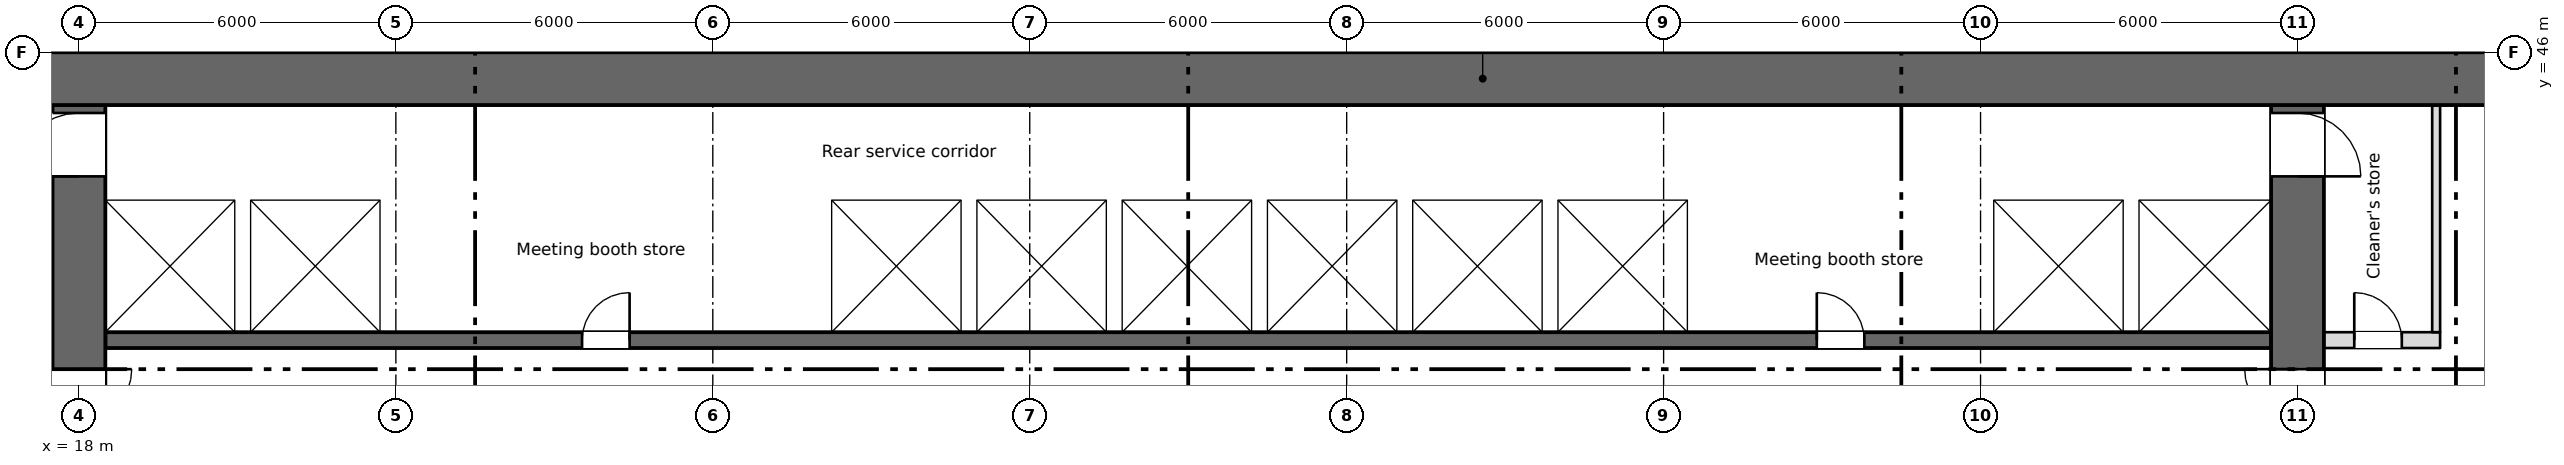
"""IFC4 building model, lengths in metres.
Left out: names, types, materials, properties, quantities, classifications, styles, units other than length and angle.
Written with IfcOpenShell. Run it as: python <this file> out.ifc"""

import sys

from ifc_helpers import new_model, si_unit, direction, frame, frame_2d, origin, place, context, subcontext, project, spatial, rectangle, extrude, element, fill, save


model = new_model("IFC4")
c1 = context("Model", 3, precision=1e-05, world=origin(), true_north=direction((0.0, 1.0)))
c2 = subcontext(c1, "Body", "Model", "MODEL_VIEW")
j1 = project(units=[si_unit("LENGTHUNIT", "METRE"), si_unit("PLANEANGLEUNIT", "RADIAN")], contexts=[c1])
p1 = place(None, origin())
s1 = spatial("IfcSite", under=j1, at=p1, CompositionType="ELEMENT")
p2 = place(p1, origin())
s2 = spatial("IfcBuilding", under=s1, at=p2, CompositionType="ELEMENT")
p3 = place(p2, frame((0.0, 0.0, 67.5)))
s3 = spatial("IfcBuildingStorey", under=s2, at=p3, CompositionType="ELEMENT", Elevation=67.5)
p4 = place(p3, frame((5.55, 45.5, 0.0), z_axis=(0.0, 0.0, 1.0), x_axis=(1.0, 0.0, 0.0)))
e1 = element("IfcWall", 1, at=p4, inside=s3, PredefinedType="SHEAR", context=c2, shape_type="SweptSolid", body=[
    extrude(rectangle(XDim=66.9, YDim=1.0, at=frame_2d((33.45, 0.0))), origin(), (0.0, 0.0, 1.0), 3.35),
])
p5 = place(p4, frame((1.2, 0.0, 0.6)))
e2 = element("IfcOpeningElement", 2, at=p5, cuts=e1, PredefinedType="OPENING", context=c2, shape_type="SweptSolid", body=[
    extrude(rectangle(XDim=0.6, YDim=2.4, at=frame_2d((0.3, 1.2))), frame((0.0, 0.51, 0.0), z_axis=(0.0, -1.0, 0.0), x_axis=(1.0, 0.0, 0.0)), (0.0, 0.0, 1.0), 1.02),
])
p6 = place(p4, frame((7.2, 0.0, 0.6)))
e3 = element("IfcOpeningElement", 3, at=p6, cuts=e1, PredefinedType="OPENING", context=c2, shape_type="SweptSolid", body=[
    extrude(rectangle(XDim=0.6, YDim=2.4, at=frame_2d((0.3, 1.2))), frame((0.0, 0.51, 0.0), z_axis=(0.0, -1.0, 0.0), x_axis=(1.0, 0.0, 0.0)), (0.0, 0.0, 1.0), 1.02),
])
p7 = place(p4, frame((61.2, 0.0, 0.6)))
e4 = element("IfcOpeningElement", 4, at=p7, cuts=e1, PredefinedType="OPENING", context=c2, shape_type="SweptSolid", body=[
    extrude(rectangle(XDim=0.6, YDim=2.4, at=frame_2d((0.3, 1.2))), frame((0.0, 0.51, 0.0), z_axis=(0.0, -1.0, 0.0), x_axis=(1.0, 0.0, 0.0)), (0.0, 0.0, 1.0), 1.02),
])
p8 = place(p3, frame((18.0, 28.4, 0.0), z_axis=(0.0, 0.0, 1.0), x_axis=(0.0, 1.0, 0.0)))
e5 = element("IfcWall", 5, at=p8, inside=s3, PredefinedType="SHEAR", context=c2, shape_type="SweptSolid", body=[
    extrude(rectangle(XDim=16.6, YDim=1.0, at=frame_2d((8.3, 0.0))), origin(), (0.0, 0.0, 1.0), 3.35),
])
p9 = place(p8, frame((9.6, 0.0, 0.0)))
e6 = element("IfcOpeningElement", 6, at=p9, cuts=e5, PredefinedType="OPENING", context=c2, shape_type="SweptSolid", body=[
    extrude(rectangle(XDim=2.0, YDim=2.1, at=frame_2d((1.0, 1.05))), frame((0.0, 0.51, 0.0), z_axis=(0.0, -1.0, 0.0), x_axis=(1.0, 0.0, 0.0)), (0.0, 0.0, 1.0), 1.02),
])
p10 = place(p8, frame((15.25, 0.0, 0.0)))
e7 = element("IfcOpeningElement", 7, at=p10, cuts=e5, PredefinedType="OPENING", context=c2, shape_type="SweptSolid", body=[
    extrude(rectangle(XDim=1.2, YDim=2.1, at=frame_2d((0.6, 1.05))), frame((0.0, 0.51, 0.0), z_axis=(0.0, -1.0, 0.0), x_axis=(1.0, 0.0, 0.0)), (0.0, 0.0, 1.0), 1.02),
])
p11 = place(p3, frame((60.0, 28.4, 0.0), z_axis=(0.0, 0.0, 1.0), x_axis=(0.0, 1.0, 0.0)))
e8 = element("IfcWall", 8, at=p11, inside=s3, PredefinedType="SHEAR", context=c2, shape_type="SweptSolid", body=[
    extrude(rectangle(XDim=16.6, YDim=1.0, at=frame_2d((8.3, 0.0))), origin(), (0.0, 0.0, 1.0), 3.35),
])
p12 = place(p11, frame((9.6, 0.0, 0.0)))
e9 = element("IfcOpeningElement", 9, at=p12, cuts=e8, PredefinedType="OPENING", context=c2, shape_type="SweptSolid", body=[
    extrude(rectangle(XDim=2.0, YDim=2.1, at=frame_2d((1.0, 1.05))), frame((0.0, 0.51, 0.0), z_axis=(0.0, -1.0, 0.0), x_axis=(1.0, 0.0, 0.0)), (0.0, 0.0, 1.0), 1.02),
])
p13 = place(p11, frame((15.25, 0.0, 0.0)))
e10 = element("IfcOpeningElement", 10, at=p13, cuts=e8, PredefinedType="OPENING", context=c2, shape_type="SweptSolid", body=[
    extrude(rectangle(XDim=1.2, YDim=2.1, at=frame_2d((0.6, 1.05))), frame((0.0, 0.51, 0.0), z_axis=(0.0, -1.0, 0.0), x_axis=(1.0, 0.0, 0.0)), (0.0, 0.0, 1.0), 1.02),
])
p14 = place(p3, frame((18.5, 40.55, 0.0), z_axis=(0.0, 0.0, 1.0), x_axis=(1.0, 0.0, 0.0)))
e11 = element("IfcWall", 11, at=p14, inside=s3, PredefinedType="SHEAR", context=c2, shape_type="SweptSolid", body=[
    extrude(rectangle(XDim=41.0, YDim=0.3, at=frame_2d((20.5, 0.0))), origin(), (0.0, 0.0, 1.0), 3.35),
])
p15 = place(p14, frame((9.025, 0.0, 0.0)))
e12 = element("IfcOpeningElement", 12, at=p15, cuts=e11, PredefinedType="OPENING", context=c2, shape_type="SweptSolid", body=[
    extrude(rectangle(XDim=0.9, YDim=2.1, at=frame_2d((0.45, 1.05))), frame((0.0, 0.16, 0.0), z_axis=(0.0, -1.0, 0.0), x_axis=(1.0, 0.0, 0.0)), (0.0, 0.0, 1.0), 0.32),
])
p16 = place(p14, frame((32.4, 0.0, 0.0)))
e13 = element("IfcOpeningElement", 13, at=p16, cuts=e11, PredefinedType="OPENING", context=c2, shape_type="SweptSolid", body=[
    extrude(rectangle(XDim=0.9, YDim=2.1, at=frame_2d((0.45, 1.05))), frame((0.0, 0.16, 0.0), z_axis=(0.0, -1.0, 0.0), x_axis=(1.0, 0.0, 0.0)), (0.0, 0.0, 1.0), 0.32),
])
p17 = place(p14, frame((14.425, 0.0, 0.0)))
e14 = element("IfcOpeningElement", 14, at=p17, cuts=e11, PredefinedType="OPENING", context=c2, shape_type="SweptSolid", body=[
    extrude(rectangle(XDim=1.1, YDim=2.1, at=frame_2d((0.55, 1.05))), frame((0.0, 0.16, 0.0), z_axis=(0.0, -1.0, 0.0), x_axis=(1.0, 0.0, 0.0)), (0.0, 0.0, 1.0), 0.32),
])
p18 = place(p14, frame((17.175, 0.0, 0.0)))
e15 = element("IfcOpeningElement", 15, at=p18, cuts=e11, PredefinedType="OPENING", context=c2, shape_type="SweptSolid", body=[
    extrude(rectangle(XDim=1.1, YDim=2.1, at=frame_2d((0.55, 1.05))), frame((0.0, 0.16, 0.0), z_axis=(0.0, -1.0, 0.0), x_axis=(1.0, 0.0, 0.0)), (0.0, 0.0, 1.0), 0.32),
])
p19 = place(p14, frame((19.925, 0.0, 0.0)))
e16 = element("IfcOpeningElement", 16, at=p19, cuts=e11, PredefinedType="OPENING", context=c2, shape_type="SweptSolid", body=[
    extrude(rectangle(XDim=1.1, YDim=2.1, at=frame_2d((0.55, 1.05))), frame((0.0, 0.16, 0.0), z_axis=(0.0, -1.0, 0.0), x_axis=(1.0, 0.0, 0.0)), (0.0, 0.0, 1.0), 0.32),
])
p20 = place(p14, frame((22.675, 0.0, 0.0)))
e17 = element("IfcOpeningElement", 17, at=p20, cuts=e11, PredefinedType="OPENING", context=c2, shape_type="SweptSolid", body=[
    extrude(rectangle(XDim=1.1, YDim=2.1, at=frame_2d((0.55, 1.05))), frame((0.0, 0.16, 0.0), z_axis=(0.0, -1.0, 0.0), x_axis=(1.0, 0.0, 0.0)), (0.0, 0.0, 1.0), 0.32),
])
p21 = place(p14, frame((36.375, 0.0, 0.0)))
e18 = element("IfcOpeningElement", 18, at=p21, cuts=e11, PredefinedType="OPENING", context=c2, shape_type="SweptSolid", body=[
    extrude(rectangle(XDim=1.2, YDim=2.1, at=frame_2d((0.6, 1.05))), frame((0.0, 0.16, 0.0), z_axis=(0.0, -1.0, 0.0), x_axis=(1.0, 0.0, 0.0)), (0.0, 0.0, 1.0), 0.32),
])
p22 = place(p14, frame((39.15, 0.0, 0.0)))
e19 = element("IfcOpeningElement", 19, at=p22, cuts=e11, PredefinedType="OPENING", context=c2, shape_type="SweptSolid", body=[
    extrude(rectangle(XDim=1.2, YDim=2.1, at=frame_2d((0.6, 1.05))), frame((0.0, 0.16, 0.0), z_axis=(0.0, -1.0, 0.0), x_axis=(1.0, 0.0, 0.0)), (0.0, 0.0, 1.0), 0.32),
])
p23 = place(p3, frame((18.5, 43.35, 0.0), z_axis=(0.0, 0.0, 1.0), x_axis=(1.0, 0.0, 0.0)))
e20 = element("IfcWall", 20, at=p23, inside=s3, PredefinedType="SHEAR", context=c2, shape_type="SweptSolid", body=[
    extrude(rectangle(XDim=41.0, YDim=0.3, at=frame_2d((20.5, 0.0))), origin(), (0.0, 0.0, 1.0), 3.35),
])
p24 = place(p3, frame((60.5, 40.55, 0.0), z_axis=(0.0, 0.0, 1.0), x_axis=(1.0, 0.0, 0.0)))
e21 = element("IfcWall", 21, at=p24, inside=s3, PredefinedType="PARTITIONING", context=c2, shape_type="SweptSolid", body=[
    extrude(rectangle(XDim=2.2, YDim=0.3, at=frame_2d((1.1, 0.0))), origin(), (0.0, 0.0, 1.0), 3.35),
])
p25 = place(p24, frame((0.575, 0.0, 0.0)))
e22 = element("IfcOpeningElement", 22, at=p25, cuts=e21, PredefinedType="OPENING", context=c2, shape_type="SweptSolid", body=[
    extrude(rectangle(XDim=0.9, YDim=2.1, at=frame_2d((0.45, 1.05))), frame((0.0, 0.16, 0.0), z_axis=(0.0, -1.0, 0.0), x_axis=(1.0, 0.0, 0.0)), (0.0, 0.0, 1.0), 0.32),
])
for number, where, z_axis, x_axis in (
    (23, (21.1, 40.7, 0.0), (0.0, 0.0, 1.0), (0.0, 1.0, 0.0)),
    (24, (23.85, 40.7, 0.0), (0.0, 0.0, 1.0), (0.0, 1.0, 0.0)),
    (25, (32.1, 40.7, 0.0), (0.0, 0.0, 1.0), (0.0, 1.0, 0.0)),
    (26, (34.85, 40.7, 0.0), (0.0, 0.0, 1.0), (0.0, 1.0, 0.0)),
    (27, (37.6, 40.7, 0.0), (0.0, 0.0, 1.0), (0.0, 1.0, 0.0)),
    (28, (40.35, 40.7, 0.0), (0.0, 0.0, 1.0), (0.0, 1.0, 0.0)),
    (29, (43.1, 40.7, 0.0), (0.0, 0.0, 1.0), (0.0, 1.0, 0.0)),
    (30, (45.85, 40.7, 0.0), (0.0, 0.0, 1.0), (0.0, 1.0, 0.0)),
    (31, (48.6, 40.7, 0.0), (0.0, 0.0, 1.0), (0.0, 1.0, 0.0)),
    (32, (54.1, 40.7, 0.0), (0.0, 0.0, 1.0), (0.0, 1.0, 0.0)),
    (33, (56.85, 40.7, 0.0), (0.0, 0.0, 1.0), (0.0, 1.0, 0.0)),
):
    element("IfcWall", number, at=place(p3, frame(where, z_axis=z_axis, x_axis=x_axis)), inside=s3, PredefinedType="SHEAR", context=c2, shape_type="SweptSolid", body=[
        extrude(rectangle(XDim=2.5, YDim=0.3, at=frame_2d((1.25, 0.0))), origin(), (0.0, 0.0, 1.0), 3.35),
    ])
p26 = place(p3, frame((62.625, 40.7, 0.0), z_axis=(0.0, 0.0, 1.0), x_axis=(0.0, 1.0, 0.0)))
e34 = element("IfcWall", 34, at=p26, inside=s3, PredefinedType="PARTITIONING", context=c2, shape_type="SweptSolid", body=[
    extrude(rectangle(XDim=4.3, YDim=0.15, at=frame_2d((2.15, 0.0))), origin(), (0.0, 0.0, 1.0), 3.35),
])
p27 = place(p25, origin())
e35 = element("IfcDoor", 35, at=p27, inside=s3, OperationType="SINGLE_SWING_LEFT", PredefinedType="DOOR", context=c2, shape_type="SweptSolid", body=[
    extrude(rectangle(XDim=0.9, YDim=2.1, at=frame_2d((0.45, 1.05))), frame((0.0, 0.025, 0.0), z_axis=(0.0, -1.0, 0.0), x_axis=(1.0, 0.0, 0.0)), (0.0, 0.0, 1.0), 0.05),
])
fill(e22, e35)
p28 = place(p15, origin())
e36 = element("IfcDoor", 36, at=p28, inside=s3, OperationType="SINGLE_SWING_RIGHT", PredefinedType="DOOR", context=c2, shape_type="SweptSolid", body=[
    extrude(rectangle(XDim=0.9, YDim=2.1, at=frame_2d((0.45, 1.05))), frame((0.0, 0.025, 0.0), z_axis=(0.0, -1.0, 0.0), x_axis=(1.0, 0.0, 0.0)), (0.0, 0.0, 1.0), 0.05),
])
fill(e12, e36)
p29 = place(p16, origin())
e37 = element("IfcDoor", 37, at=p29, inside=s3, OperationType="SINGLE_SWING_LEFT", PredefinedType="DOOR", context=c2, shape_type="SweptSolid", body=[
    extrude(rectangle(XDim=0.9, YDim=2.1, at=frame_2d((0.45, 1.05))), frame((0.0, 0.025, 0.0), z_axis=(0.0, -1.0, 0.0), x_axis=(1.0, 0.0, 0.0)), (0.0, 0.0, 1.0), 0.05),
])
fill(e13, e37)
p30 = place(p17, origin())
e38 = element("IfcDoor", 38, at=p30, inside=s3, OperationType="SLIDING_TO_LEFT", PredefinedType="DOOR", context=c2, shape_type="SweptSolid", body=[
    extrude(rectangle(XDim=1.1, YDim=2.1, at=frame_2d((0.55, 1.05))), frame((0.0, 0.025, 0.0), z_axis=(0.0, -1.0, 0.0), x_axis=(1.0, 0.0, 0.0)), (0.0, 0.0, 1.0), 0.05),
])
fill(e14, e38)
p31 = place(p18, origin())
e39 = element("IfcDoor", 39, at=p31, inside=s3, OperationType="SLIDING_TO_LEFT", PredefinedType="DOOR", context=c2, shape_type="SweptSolid", body=[
    extrude(rectangle(XDim=1.1, YDim=2.1, at=frame_2d((0.55, 1.05))), frame((0.0, 0.025, 0.0), z_axis=(0.0, -1.0, 0.0), x_axis=(1.0, 0.0, 0.0)), (0.0, 0.0, 1.0), 0.05),
])
fill(e15, e39)
p32 = place(p19, origin())
e40 = element("IfcDoor", 40, at=p32, inside=s3, OperationType="SLIDING_TO_LEFT", PredefinedType="DOOR", context=c2, shape_type="SweptSolid", body=[
    extrude(rectangle(XDim=1.1, YDim=2.1, at=frame_2d((0.55, 1.05))), frame((0.0, 0.025, 0.0), z_axis=(0.0, -1.0, 0.0), x_axis=(1.0, 0.0, 0.0)), (0.0, 0.0, 1.0), 0.05),
])
fill(e16, e40)
p33 = place(p20, origin())
e41 = element("IfcDoor", 41, at=p33, inside=s3, OperationType="SLIDING_TO_LEFT", PredefinedType="DOOR", context=c2, shape_type="SweptSolid", body=[
    extrude(rectangle(XDim=1.1, YDim=2.1, at=frame_2d((0.55, 1.05))), frame((0.0, 0.025, 0.0), z_axis=(0.0, -1.0, 0.0), x_axis=(1.0, 0.0, 0.0)), (0.0, 0.0, 1.0), 0.05),
])
fill(e17, e41)
p34 = place(p21, origin())
e42 = element("IfcDoor", 42, at=p34, inside=s3, OperationType="SLIDING_TO_LEFT", PredefinedType="DOOR", context=c2, shape_type="SweptSolid", body=[
    extrude(rectangle(XDim=1.2, YDim=2.1, at=frame_2d((0.6, 1.05))), frame((0.0, 0.025, 0.0), z_axis=(0.0, -1.0, 0.0), x_axis=(1.0, 0.0, 0.0)), (0.0, 0.0, 1.0), 0.05),
])
fill(e18, e42)
p35 = place(p22, origin())
e43 = element("IfcDoor", 43, at=p35, inside=s3, OperationType="SLIDING_TO_LEFT", PredefinedType="DOOR", context=c2, shape_type="SweptSolid", body=[
    extrude(rectangle(XDim=1.2, YDim=2.1, at=frame_2d((0.6, 1.05))), frame((0.0, 0.025, 0.0), z_axis=(0.0, -1.0, 0.0), x_axis=(1.0, 0.0, 0.0)), (0.0, 0.0, 1.0), 0.05),
])
fill(e19, e43)
p36 = place(p9, origin())
e44 = element("IfcDoor", 44, at=p36, inside=s3, OperationType="DOUBLE_DOOR_SINGLE_SWING", PredefinedType="DOOR", context=c2, shape_type="SweptSolid", body=[
    extrude(rectangle(XDim=2.0, YDim=2.1, at=frame_2d((1.0, 1.05))), frame((0.0, 0.025, 0.0), z_axis=(0.0, -1.0, 0.0), x_axis=(1.0, 0.0, 0.0)), (0.0, 0.0, 1.0), 0.05),
])
fill(e6, e44)
p37 = place(p12, origin())
e45 = element("IfcDoor", 45, at=p37, inside=s3, OperationType="DOUBLE_DOOR_SINGLE_SWING", PredefinedType="DOOR", context=c2, shape_type="SweptSolid", body=[
    extrude(rectangle(XDim=2.0, YDim=2.1, at=frame_2d((1.0, 1.05))), frame((0.0, 0.025, 0.0), z_axis=(0.0, -1.0, 0.0), x_axis=(1.0, 0.0, 0.0)), (0.0, 0.0, 1.0), 0.05),
])
fill(e9, e45)
p38 = place(p10, origin())
e46 = element("IfcDoor", 46, at=p38, inside=s3, OperationType="SINGLE_SWING_LEFT", PredefinedType="DOOR", context=c2, shape_type="SweptSolid", body=[
    extrude(rectangle(XDim=1.2, YDim=2.1, at=frame_2d((0.6, 1.05))), frame((0.0, 0.025, 0.0), z_axis=(0.0, -1.0, 0.0), x_axis=(1.0, 0.0, 0.0)), (0.0, 0.0, 1.0), 0.05),
])
fill(e7, e46)
p39 = place(p13, origin())
e47 = element("IfcDoor", 47, at=p39, inside=s3, OperationType="SINGLE_SWING_LEFT", PredefinedType="DOOR", context=c2, shape_type="SweptSolid", body=[
    extrude(rectangle(XDim=1.2, YDim=2.1, at=frame_2d((0.6, 1.05))), frame((0.0, 0.025, 0.0), z_axis=(0.0, -1.0, 0.0), x_axis=(1.0, 0.0, 0.0)), (0.0, 0.0, 1.0), 0.05),
])
fill(e10, e47)
save(model, sys.argv[1])
